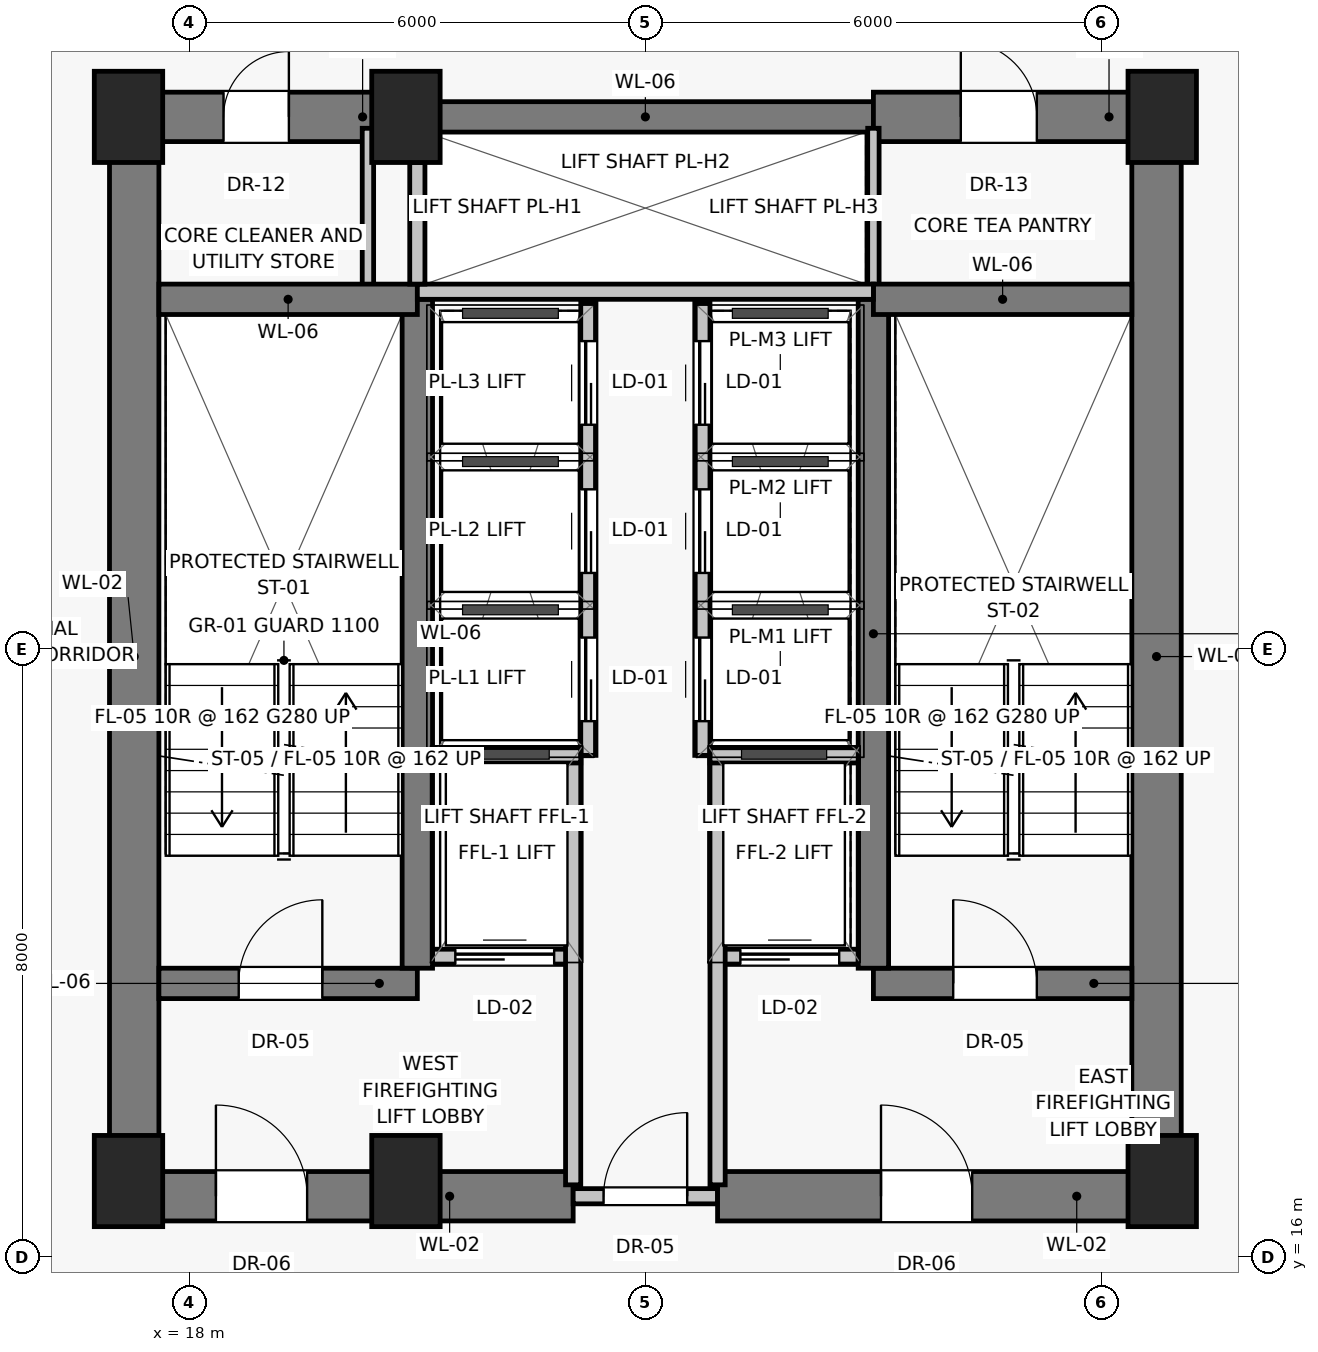
"""IFC4 building model, lengths in metres.
Left out: names, types, materials, properties, quantities, classifications, styles, units other than length and angle.
Written with IfcOpenShell. Run it as: python <this file> out.ifc"""

import sys

from ifc_helpers import new_model, si_unit, direction, frame, frame_2d, origin, origin_2d, place, context, subcontext, project, spatial, rectangle, extrude, source, transform, mapped, element, fill, save


model = new_model("IFC4")
c1 = context("Model", 3, precision=1e-05, world=origin(), true_north=direction((0.0, 1.0)))
c2 = subcontext(c1, "Body", "Model", "MODEL_VIEW")
j1 = project(units=[si_unit("LENGTHUNIT", "METRE"), si_unit("PLANEANGLEUNIT", "RADIAN")], contexts=[c1])
p1 = place(None, origin())
s1 = spatial("IfcSite", under=j1, at=p1, CompositionType="ELEMENT")
p2 = place(p1, origin())
s2 = spatial("IfcBuilding", under=s1, at=p2, CompositionType="ELEMENT")
p3 = place(p2, frame((0.0, 0.0, 89.45)))
s3 = spatial("IfcBuildingStorey", under=s2, at=p3, CompositionType="ELEMENT", Elevation=89.45)
for number, where, z_axis, x_axis in (
    (1, (17.2, 17.0, 0.0), (0.0, 0.0, 1.0), (1.0, 0.0, 0.0)),
    (2, (20.85, 17.0, 0.0), (0.0, 0.0, 1.0), (1.0, 0.0, 0.0)),
    (3, (30.8, 17.0, 0.0), (0.0, 0.0, 1.0), (1.0, 0.0, 0.0)),
    (4, (17.2, 31.0, 0.0), (0.0, 0.0, 1.0), (1.0, 0.0, 0.0)),
    (5, (20.85, 31.0, 0.0), (0.0, 0.0, 1.0), (1.0, 0.0, 0.0)),
    (6, (30.8, 31.0, 0.0), (0.0, 0.0, 1.0), (1.0, 0.0, 0.0)),
):
    element("IfcColumn", number, at=place(p3, frame(where, z_axis=z_axis, x_axis=x_axis)), inside=s3, PredefinedType="PILASTER", context=c2, shape_type="SweptSolid", body=[
        extrude(rectangle(XDim=0.9, YDim=1.2, at=origin_2d()), origin(), (0.0, 0.0, 1.0), 3.25),
    ])
for number, where, z_axis, x_axis in (
    (7, (17.275, 16.8, 0.0), (0.0, 0.0, 1.0), (0.0, 1.0, 0.0)),
    (8, (30.725, 16.8, 0.0), (0.0, 0.0, 1.0), (0.0, 1.0, 0.0)),
):
    element("IfcWall", number, at=place(p3, frame(where, z_axis=z_axis, x_axis=x_axis)), inside=s3, PredefinedType="SHEAR", context=c2, shape_type="SweptSolid", body=[
        extrude(rectangle(XDim=14.2, YDim=0.65, at=frame_2d((7.1, 0.0))), origin(), (0.0, 0.0, 1.0), 3.0),
    ])
p4 = place(p3, frame((17.2, 16.8, 0.0), z_axis=(0.0, 0.0, 1.0), x_axis=(1.0, 0.0, 0.0)))
e9 = element("IfcWall", 9, at=p4, inside=s3, PredefinedType="SHEAR", context=c2, shape_type="SweptSolid", body=[
    extrude(rectangle(XDim=5.85, YDim=0.65, at=frame_2d((2.925, 0.0))), origin(), (0.0, 0.0, 1.0), 3.0),
])
p5 = place(p4, frame((1.15, 0.0, 0.0)))
e10 = element("IfcOpeningElement", 10, at=p5, cuts=e9, PredefinedType="OPENING", context=c2, shape_type="SweptSolid", body=[
    extrude(rectangle(XDim=1.2, YDim=2.03, at=frame_2d((0.6, 1.015))), frame((0.0, 0.335, 0.0), z_axis=(0.0, -1.0, 0.0), x_axis=(1.0, 0.0, 0.0)), (0.0, 0.0, 1.0), 0.67),
])
p6 = place(p3, frame((23.05, 16.8, 0.0), z_axis=(0.0, 0.0, 1.0), x_axis=(1.0, 0.0, 0.0)))
e11 = element("IfcWall", 11, at=p6, inside=s3, PredefinedType="SOLIDWALL", context=c2, shape_type="SweptSolid", body=[
    extrude(rectangle(XDim=1.9, YDim=0.2, at=frame_2d((0.95, 0.0))), origin(), (0.0, 0.0, 1.0), 2.15),
])
p7 = place(p6, frame((0.4, 0.0, 0.0)))
e12 = element("IfcOpeningElement", 12, at=p7, cuts=e11, PredefinedType="OPENING", context=c2, shape_type="SweptSolid", body=[
    extrude(rectangle(XDim=1.1, YDim=2.03, at=frame_2d((0.55, 1.015))), frame((0.0, 0.11, 0.0), z_axis=(0.0, -1.0, 0.0), x_axis=(1.0, 0.0, 0.0)), (0.0, 0.0, 1.0), 0.22),
])
p8 = place(p3, frame((24.95, 16.8, 0.0), z_axis=(0.0, 0.0, 1.0), x_axis=(1.0, 0.0, 0.0)))
e13 = element("IfcWall", 13, at=p8, inside=s3, PredefinedType="SHEAR", context=c2, shape_type="SweptSolid", body=[
    extrude(rectangle(XDim=5.85, YDim=0.65, at=frame_2d((2.925, 0.0))), origin(), (0.0, 0.0, 1.0), 3.0),
])
p9 = place(p8, frame((2.15, 0.0, 0.0)))
e14 = element("IfcOpeningElement", 14, at=p9, cuts=e13, PredefinedType="OPENING", context=c2, shape_type="SweptSolid", body=[
    extrude(rectangle(XDim=1.2, YDim=2.03, at=frame_2d((0.6, 1.015))), frame((0.0, 0.335, 0.0), z_axis=(0.0, -1.0, 0.0), x_axis=(1.0, 0.0, 0.0)), (0.0, 0.0, 1.0), 0.67),
])
p10 = place(p3, frame((17.2, 31.0, 0.0), z_axis=(0.0, 0.0, 1.0), x_axis=(1.0, 0.0, 0.0)))
e15 = element("IfcWall", 15, at=p10, inside=s3, PredefinedType="SHEAR", context=c2, shape_type="SweptSolid", body=[
    extrude(rectangle(XDim=3.8, YDim=0.65, at=frame_2d((1.9, 0.0))), origin(), (0.0, 0.0, 1.0), 3.0),
])
p11 = place(p10, frame((1.25, 0.0, 0.0)))
e16 = element("IfcOpeningElement", 16, at=p11, cuts=e15, PredefinedType="OPENING", context=c2, shape_type="SweptSolid", body=[
    extrude(rectangle(XDim=0.86, YDim=2.01, at=frame_2d((0.43, 1.005))), frame((0.0, 0.335, 0.0), z_axis=(0.0, -1.0, 0.0), x_axis=(1.0, 0.0, 0.0)), (0.0, 0.0, 1.0), 0.67),
])
p12 = place(p3, frame((21.0, 31.0, 0.0), z_axis=(0.0, 0.0, 1.0), x_axis=(1.0, 0.0, 0.0)))
e17 = element("IfcWall", 17, at=p12, inside=s3, PredefinedType="SHEAR", context=c2, shape_type="SweptSolid", body=[
    extrude(rectangle(XDim=6.0, YDim=0.4, at=frame_2d((3.0, 0.0))), origin(), (0.0, 0.0, 1.0), 3.0),
])
p13 = place(p3, frame((27.0, 31.0, 0.0), z_axis=(0.0, 0.0, 1.0), x_axis=(1.0, 0.0, 0.0)))
e18 = element("IfcWall", 18, at=p13, inside=s3, PredefinedType="SHEAR", context=c2, shape_type="SweptSolid", body=[
    extrude(rectangle(XDim=3.8, YDim=0.65, at=frame_2d((1.9, 0.0))), origin(), (0.0, 0.0, 1.0), 3.0),
])
p14 = place(p13, frame((1.15, 0.0, 0.0)))
e19 = element("IfcOpeningElement", 19, at=p14, cuts=e18, PredefinedType="OPENING", context=c2, shape_type="SweptSolid", body=[
    extrude(rectangle(XDim=1.0, YDim=2.01, at=frame_2d((0.5, 1.005))), frame((0.0, 0.335, 0.0), z_axis=(0.0, -1.0, 0.0), x_axis=(1.0, 0.0, 0.0)), (0.0, 0.0, 1.0), 0.67),
])
for number, where, z_axis, x_axis in (
    (20, (20.35, 28.65, 0.0), (0.0, 0.0, 1.0), (0.0, 1.0, 0.0)),
    (21, (27.0, 28.65, 0.0), (0.0, 0.0, 1.0), (0.0, 1.0, 0.0)),
):
    element("IfcWall", number, at=place(p3, frame(where, z_axis=z_axis, x_axis=x_axis)), inside=s3, PredefinedType="PARTITIONING", context=c2, shape_type="SweptSolid", body=[
        extrude(rectangle(XDim=2.2, YDim=0.15, at=frame_2d((1.1, 0.0))), origin(), (0.0, 0.0, 1.0), 3.0),
    ])
p15 = place(p3, frame((17.6, 19.6, 0.0), z_axis=(0.0, 0.0, 1.0), x_axis=(1.0, 0.0, 0.0)))
e22 = element("IfcWall", 22, at=p15, inside=s3, PredefinedType="SHEAR", context=c2, shape_type="SweptSolid", body=[
    extrude(rectangle(XDim=3.4, YDim=0.4, at=frame_2d((1.7, 0.0))), origin(), (0.0, 0.0, 1.0), 3.0),
])
p16 = place(p15, frame((1.05, 0.0, 0.0)))
e23 = element("IfcOpeningElement", 23, at=p16, cuts=e22, PredefinedType="OPENING", context=c2, shape_type="SweptSolid", body=[
    extrude(rectangle(XDim=1.1, YDim=2.03, at=frame_2d((0.55, 1.015))), frame((0.0, 0.21, 0.0), z_axis=(0.0, -1.0, 0.0), x_axis=(1.0, 0.0, 0.0)), (0.0, 0.0, 1.0), 0.42),
])
p17 = place(p3, frame((21.2, 19.95, 0.0), z_axis=(0.0, 0.0, 1.0), x_axis=(1.0, 0.0, 0.0)))
e24 = element("IfcWall", 24, at=p17, inside=s3, PredefinedType="SOLIDWALL", context=c2, shape_type="SweptSolid", body=[
    extrude(rectangle(XDim=1.85, YDim=0.2, at=frame_2d((0.925, 0.0))), origin(), (0.0, 0.0, 1.0), 3.0),
])
p18 = place(p17, frame((0.3, 0.0, 0.0)))
e25 = element("IfcOpeningElement", 25, at=p18, cuts=e24, PredefinedType="OPENING", context=c2, shape_type="SweptSolid", body=[
    extrude(rectangle(XDim=1.3, YDim=2.25, at=frame_2d((0.65, 1.125))), frame((0.0, 0.11, 0.0), z_axis=(0.0, -1.0, 0.0), x_axis=(1.0, 0.0, 0.0)), (0.0, 0.0, 1.0), 0.22),
])
p19 = place(p3, frame((24.95, 19.95, 0.0), z_axis=(0.0, 0.0, 1.0), x_axis=(1.0, 0.0, 0.0)))
e26 = element("IfcWall", 26, at=p19, inside=s3, PredefinedType="SOLIDWALL", context=c2, shape_type="SweptSolid", body=[
    extrude(rectangle(XDim=1.85, YDim=0.2, at=frame_2d((0.925, 0.0))), origin(), (0.0, 0.0, 1.0), 3.0),
])
p20 = place(p19, frame((0.3, 0.0, 0.0)))
e27 = element("IfcOpeningElement", 27, at=p20, cuts=e26, PredefinedType="OPENING", context=c2, shape_type="SweptSolid", body=[
    extrude(rectangle(XDim=1.3, YDim=2.25, at=frame_2d((0.65, 1.125))), frame((0.0, 0.11, 0.0), z_axis=(0.0, -1.0, 0.0), x_axis=(1.0, 0.0, 0.0)), (0.0, 0.0, 1.0), 0.22),
])
p21 = place(p3, frame((27.0, 19.6, 0.0), z_axis=(0.0, 0.0, 1.0), x_axis=(1.0, 0.0, 0.0)))
e28 = element("IfcWall", 28, at=p21, inside=s3, PredefinedType="SHEAR", context=c2, shape_type="SweptSolid", body=[
    extrude(rectangle(XDim=3.4, YDim=0.4, at=frame_2d((1.7, 0.0))), origin(), (0.0, 0.0, 1.0), 3.0),
])
p22 = place(p21, frame((1.05, 0.0, 0.0)))
e29 = element("IfcOpeningElement", 29, at=p22, cuts=e28, PredefinedType="OPENING", context=c2, shape_type="SweptSolid", body=[
    extrude(rectangle(XDim=1.1, YDim=2.03, at=frame_2d((0.55, 1.015))), frame((0.0, 0.21, 0.0), z_axis=(0.0, -1.0, 0.0), x_axis=(1.0, 0.0, 0.0)), (0.0, 0.0, 1.0), 0.42),
])
for number, where, z_axis, x_axis in (
    (30, (21.0, 19.8, 0.0), (0.0, 0.0, 1.0), (0.0, 1.0, 0.0)),
    (31, (27.0, 19.8, 0.0), (0.0, 0.0, 1.0), (0.0, 1.0, 0.0)),
):
    element("IfcWall", number, at=place(p3, frame(where, z_axis=z_axis, x_axis=x_axis)), inside=s3, PredefinedType="SHEAR", context=c2, shape_type="SweptSolid", body=[
        extrude(rectangle(XDim=8.8, YDim=0.4, at=frame_2d((4.4, 0.0))), origin(), (0.0, 0.0, 1.0), 3.0),
    ])
for number, where, z_axis, x_axis in (
    (32, (17.6, 28.6, 0.0), (0.0, 0.0, 1.0), (1.0, 0.0, 0.0)),
    (33, (27.0, 28.6, 0.0), (0.0, 0.0, 1.0), (1.0, 0.0, 0.0)),
):
    element("IfcWall", number, at=place(p3, frame(where, z_axis=z_axis, x_axis=x_axis)), inside=s3, PredefinedType="SHEAR", context=c2, shape_type="SweptSolid", body=[
        extrude(rectangle(XDim=3.4, YDim=0.4, at=frame_2d((1.7, 0.0))), origin(), (0.0, 0.0, 1.0), 3.0),
    ])
for number, where, z_axis, x_axis in (
    (34, (23.05, 16.95, 0.0), (0.0, 0.0, 1.0), (0.0, 1.0, 0.0)),
    (35, (24.95, 16.95, 0.0), (0.0, 0.0, 1.0), (0.0, 1.0, 0.0)),
):
    element("IfcWall", number, at=place(p3, frame(where, z_axis=z_axis, x_axis=x_axis)), inside=s3, PredefinedType="SOLIDWALL", context=c2, shape_type="SweptSolid", body=[
        extrude(rectangle(XDim=5.6, YDim=0.2, at=frame_2d((2.8, 0.0))), origin(), (0.0, 0.0, 1.0), 3.0),
    ])
for number, where, z_axis, x_axis in (
    (36, (21.2, 22.6, 0.0), (0.0, 0.0, 1.0), (1.0, 0.0, 0.0)),
    (37, (24.85, 22.6, 0.0), (0.0, 0.0, 1.0), (1.0, 0.0, 0.0)),
):
    element("IfcWall", number, at=place(p3, frame(where, z_axis=z_axis, x_axis=x_axis)), inside=s3, PredefinedType="SOLIDWALL", context=c2, shape_type="SweptSolid", body=[
        extrude(rectangle(XDim=1.95, YDim=0.2, at=frame_2d((0.975, 0.0))), origin(), (0.0, 0.0, 1.0), 3.0),
    ])
p23 = place(p3, frame((21.0, 28.7, 0.0), z_axis=(0.0, 0.0, 1.0), x_axis=(1.0, 0.0, 0.0)))
e38 = element("IfcWall", 38, at=p23, inside=s3, PredefinedType="SOLIDWALL", context=c2, shape_type="SweptSolid", body=[
    extrude(rectangle(XDim=6.0, YDim=0.2, at=frame_2d((3.0, 0.0))), origin(), (0.0, 0.0, 1.0), 3.0),
])
p24 = place(p3, frame((21.0, 28.8, 0.0), z_axis=(0.0, 0.0, 1.0), x_axis=(0.0, 1.0, 0.0)))
e39 = element("IfcWall", 39, at=p24, inside=s3, PredefinedType="SOLIDWALL", context=c2, shape_type="SweptSolid", body=[
    extrude(rectangle(XDim=1.6, YDim=0.2, at=frame_2d((0.8, 0.0))), origin(), (0.0, 0.0, 1.0), 3.0),
])
p25 = place(p3, frame((23.25, 22.6, 0.0), z_axis=(0.0, 0.0, 1.0), x_axis=(0.0, 1.0, 0.0)))
e40 = element("IfcWall", 40, at=p25, inside=s3, PredefinedType="SOLIDWALL", context=c2, shape_type="SweptSolid", body=[
    extrude(rectangle(XDim=5.95, YDim=0.2, at=frame_2d((2.975, 0.0))), origin(), (0.0, 0.0, 1.0), 3.0),
])
p26 = place(p25, frame((0.45, 0.0, 0.0)))
e41 = element("IfcOpeningElement", 41, at=p26, cuts=e40, PredefinedType="OPENING", context=c2, shape_type="SweptSolid", body=[
    extrude(rectangle(XDim=1.1, YDim=2.08, at=frame_2d((0.55, 1.04))), frame((0.0, 0.11, 0.0), z_axis=(0.0, -1.0, 0.0), x_axis=(1.0, 0.0, 0.0)), (0.0, 0.0, 1.0), 0.22),
])
p27 = place(p25, frame((2.4, 0.0, 0.0)))
e42 = element("IfcOpeningElement", 42, at=p27, cuts=e40, PredefinedType="OPENING", context=c2, shape_type="SweptSolid", body=[
    extrude(rectangle(XDim=1.1, YDim=2.08, at=frame_2d((0.55, 1.04))), frame((0.0, 0.11, 0.0), z_axis=(0.0, -1.0, 0.0), x_axis=(1.0, 0.0, 0.0)), (0.0, 0.0, 1.0), 0.22),
])
p28 = place(p25, frame((4.35, 0.0, 0.0)))
e43 = element("IfcOpeningElement", 43, at=p28, cuts=e40, PredefinedType="OPENING", context=c2, shape_type="SweptSolid", body=[
    extrude(rectangle(XDim=1.1, YDim=2.08, at=frame_2d((0.55, 1.04))), frame((0.0, 0.11, 0.0), z_axis=(0.0, -1.0, 0.0), x_axis=(1.0, 0.0, 0.0)), (0.0, 0.0, 1.0), 0.22),
])
p29 = place(p3, frame((24.75, 22.6, 0.0), z_axis=(0.0, 0.0, 1.0), x_axis=(0.0, 1.0, 0.0)))
e44 = element("IfcWall", 44, at=p29, inside=s3, PredefinedType="SOLIDWALL", context=c2, shape_type="SweptSolid", body=[
    extrude(rectangle(XDim=5.95, YDim=0.2, at=frame_2d((2.975, 0.0))), origin(), (0.0, 0.0, 1.0), 3.0),
])
p30 = place(p29, frame((0.45, 0.0, 0.0)))
e45 = element("IfcOpeningElement", 45, at=p30, cuts=e44, PredefinedType="OPENING", context=c2, shape_type="SweptSolid", body=[
    extrude(rectangle(XDim=1.1, YDim=2.08, at=frame_2d((0.55, 1.04))), frame((0.0, 0.11, 0.0), z_axis=(0.0, -1.0, 0.0), x_axis=(1.0, 0.0, 0.0)), (0.0, 0.0, 1.0), 0.22),
])
p31 = place(p29, frame((2.4, 0.0, 0.0)))
e46 = element("IfcOpeningElement", 46, at=p31, cuts=e44, PredefinedType="OPENING", context=c2, shape_type="SweptSolid", body=[
    extrude(rectangle(XDim=1.1, YDim=2.08, at=frame_2d((0.55, 1.04))), frame((0.0, 0.11, 0.0), z_axis=(0.0, -1.0, 0.0), x_axis=(1.0, 0.0, 0.0)), (0.0, 0.0, 1.0), 0.22),
])
p32 = place(p29, frame((4.35, 0.0, 0.0)))
e47 = element("IfcOpeningElement", 47, at=p32, cuts=e44, PredefinedType="OPENING", context=c2, shape_type="SweptSolid", body=[
    extrude(rectangle(XDim=1.1, YDim=2.08, at=frame_2d((0.55, 1.04))), frame((0.0, 0.11, 0.0), z_axis=(0.0, -1.0, 0.0), x_axis=(1.0, 0.0, 0.0)), (0.0, 0.0, 1.0), 0.22),
])
m1 = source(origin(), c2, "Body", "SweptSolid", [
    extrude(rectangle(XDim=1.2, YDim=2.03, at=frame_2d((0.6, 1.015))), frame((0.0, 0.025, 0.0), z_axis=(0.0, -1.0, 0.0), x_axis=(1.0, 0.0, 0.0)), (0.0, 0.0, 1.0), 0.05),
])
p33 = place(p5, origin())
e48 = element("IfcDoor", 48, at=p33, inside=s3, OperationType="SINGLE_SWING_LEFT", PredefinedType="DOOR", context=c2, shape_type="MappedRepresentation", body=[
    mapped(m1, transform((0.0, 0.0, 0.0), scale=1.0)),
])
fill(e10, e48)
m2 = source(origin(), c2, "Body", "SweptSolid", [
    extrude(rectangle(XDim=1.1, YDim=2.03, at=frame_2d((0.55, 1.015))), frame((0.0, 0.025, 0.0), z_axis=(0.0, -1.0, 0.0), x_axis=(1.0, 0.0, 0.0)), (0.0, 0.0, 1.0), 0.05),
])
p34 = place(p7, origin())
e49 = element("IfcDoor", 49, at=p34, inside=s3, OperationType="SINGLE_SWING_RIGHT", PredefinedType="DOOR", context=c2, shape_type="MappedRepresentation", body=[
    mapped(m2, transform((0.0, 0.0, 0.0), scale=1.0)),
])
fill(e12, e49)
p35 = place(p9, origin())
e50 = element("IfcDoor", 50, at=p35, inside=s3, OperationType="SINGLE_SWING_LEFT", PredefinedType="DOOR", context=c2, shape_type="MappedRepresentation", body=[
    mapped(m1, transform((0.0, 0.0, 0.0), scale=1.0)),
])
fill(e14, e50)
m3 = source(origin(), c2, "Body", "SweptSolid", [
    extrude(rectangle(XDim=0.86, YDim=2.01, at=frame_2d((0.43, 1.005))), frame((0.0, 0.025, 0.0), z_axis=(0.0, -1.0, 0.0), x_axis=(1.0, 0.0, 0.0)), (0.0, 0.0, 1.0), 0.05),
])
p36 = place(p11, origin())
e51 = element("IfcDoor", 51, at=p36, inside=s3, OperationType="SINGLE_SWING_RIGHT", PredefinedType="DOOR", context=c2, shape_type="MappedRepresentation", body=[
    mapped(m3, transform((0.0, 0.0, 0.0), scale=1.0)),
])
fill(e16, e51)
m4 = source(origin(), c2, "Body", "SweptSolid", [
    extrude(rectangle(XDim=1.0, YDim=2.01, at=frame_2d((0.5, 1.005))), frame((0.0, 0.025, 0.0), z_axis=(0.0, -1.0, 0.0), x_axis=(1.0, 0.0, 0.0)), (0.0, 0.0, 1.0), 0.05),
])
p37 = place(p14, origin())
e52 = element("IfcDoor", 52, at=p37, inside=s3, OperationType="SINGLE_SWING_LEFT", PredefinedType="DOOR", context=c2, shape_type="MappedRepresentation", body=[
    mapped(m4, transform((0.0, 0.0, 0.0), scale=1.0)),
])
fill(e19, e52)
p38 = place(p16, origin())
e53 = element("IfcDoor", 53, at=p38, inside=s3, OperationType="SINGLE_SWING_RIGHT", PredefinedType="DOOR", context=c2, shape_type="MappedRepresentation", body=[
    mapped(m2, transform((0.0, 0.0, 0.0), scale=1.0)),
])
fill(e23, e53)
m5 = source(origin(), c2, "Body", "SweptSolid", [
    extrude(rectangle(XDim=1.3, YDim=2.25, at=frame_2d((0.65, 1.125))), frame((0.0, 0.025, 0.0), z_axis=(0.0, -1.0, 0.0), x_axis=(1.0, 0.0, 0.0)), (0.0, 0.0, 1.0), 0.05),
])
p39 = place(p18, origin())
e54 = element("IfcDoor", 54, at=p39, inside=s3, OperationType="SLIDING_TO_LEFT", PredefinedType="DOOR", context=c2, shape_type="MappedRepresentation", body=[
    mapped(m5, transform((0.0, 0.0, 0.0), scale=1.0)),
])
fill(e25, e54)
p40 = place(p20, origin())
e55 = element("IfcDoor", 55, at=p40, inside=s3, OperationType="SLIDING_TO_LEFT", PredefinedType="DOOR", context=c2, shape_type="MappedRepresentation", body=[
    mapped(m5, transform((0.0, 0.0, 0.0), scale=1.0)),
])
fill(e27, e55)
p41 = place(p22, origin())
e56 = element("IfcDoor", 56, at=p41, inside=s3, OperationType="SINGLE_SWING_LEFT", PredefinedType="DOOR", context=c2, shape_type="MappedRepresentation", body=[
    mapped(m2, transform((0.0, 0.0, 0.0), scale=1.0)),
])
fill(e29, e56)
m6 = source(origin(), c2, "Body", "SweptSolid", [
    extrude(rectangle(XDim=1.1, YDim=2.08, at=frame_2d((0.55, 1.04))), frame((0.0, 0.025, 0.0), z_axis=(0.0, -1.0, 0.0), x_axis=(1.0, 0.0, 0.0)), (0.0, 0.0, 1.0), 0.05),
])
p42 = place(p26, origin())
e57 = element("IfcDoor", 57, at=p42, inside=s3, OperationType="SLIDING_TO_LEFT", PredefinedType="DOOR", context=c2, shape_type="MappedRepresentation", body=[
    mapped(m6, transform((0.0, 0.0, 0.0), scale=1.0)),
])
fill(e41, e57)
p43 = place(p27, origin())
e58 = element("IfcDoor", 58, at=p43, inside=s3, OperationType="SLIDING_TO_LEFT", PredefinedType="DOOR", context=c2, shape_type="MappedRepresentation", body=[
    mapped(m6, transform((0.0, 0.0, 0.0), scale=1.0)),
])
fill(e42, e58)
p44 = place(p28, origin())
e59 = element("IfcDoor", 59, at=p44, inside=s3, OperationType="SLIDING_TO_LEFT", PredefinedType="DOOR", context=c2, shape_type="MappedRepresentation", body=[
    mapped(m6, transform((0.0, 0.0, 0.0), scale=1.0)),
])
fill(e43, e59)
p45 = place(p30, origin())
e60 = element("IfcDoor", 60, at=p45, inside=s3, OperationType="SLIDING_TO_LEFT", PredefinedType="DOOR", context=c2, shape_type="MappedRepresentation", body=[
    mapped(m6, transform((0.0, 0.0, 0.0), scale=1.0)),
])
fill(e45, e60)
p46 = place(p31, origin())
e61 = element("IfcDoor", 61, at=p46, inside=s3, OperationType="SLIDING_TO_LEFT", PredefinedType="DOOR", context=c2, shape_type="MappedRepresentation", body=[
    mapped(m6, transform((0.0, 0.0, 0.0), scale=1.0)),
])
fill(e46, e61)
p47 = place(p32, origin())
e62 = element("IfcDoor", 62, at=p47, inside=s3, OperationType="SLIDING_TO_LEFT", PredefinedType="DOOR", context=c2, shape_type="MappedRepresentation", body=[
    mapped(m6, transform((0.0, 0.0, 0.0), scale=1.0)),
])
fill(e47, e62)
save(model, sys.argv[1])
